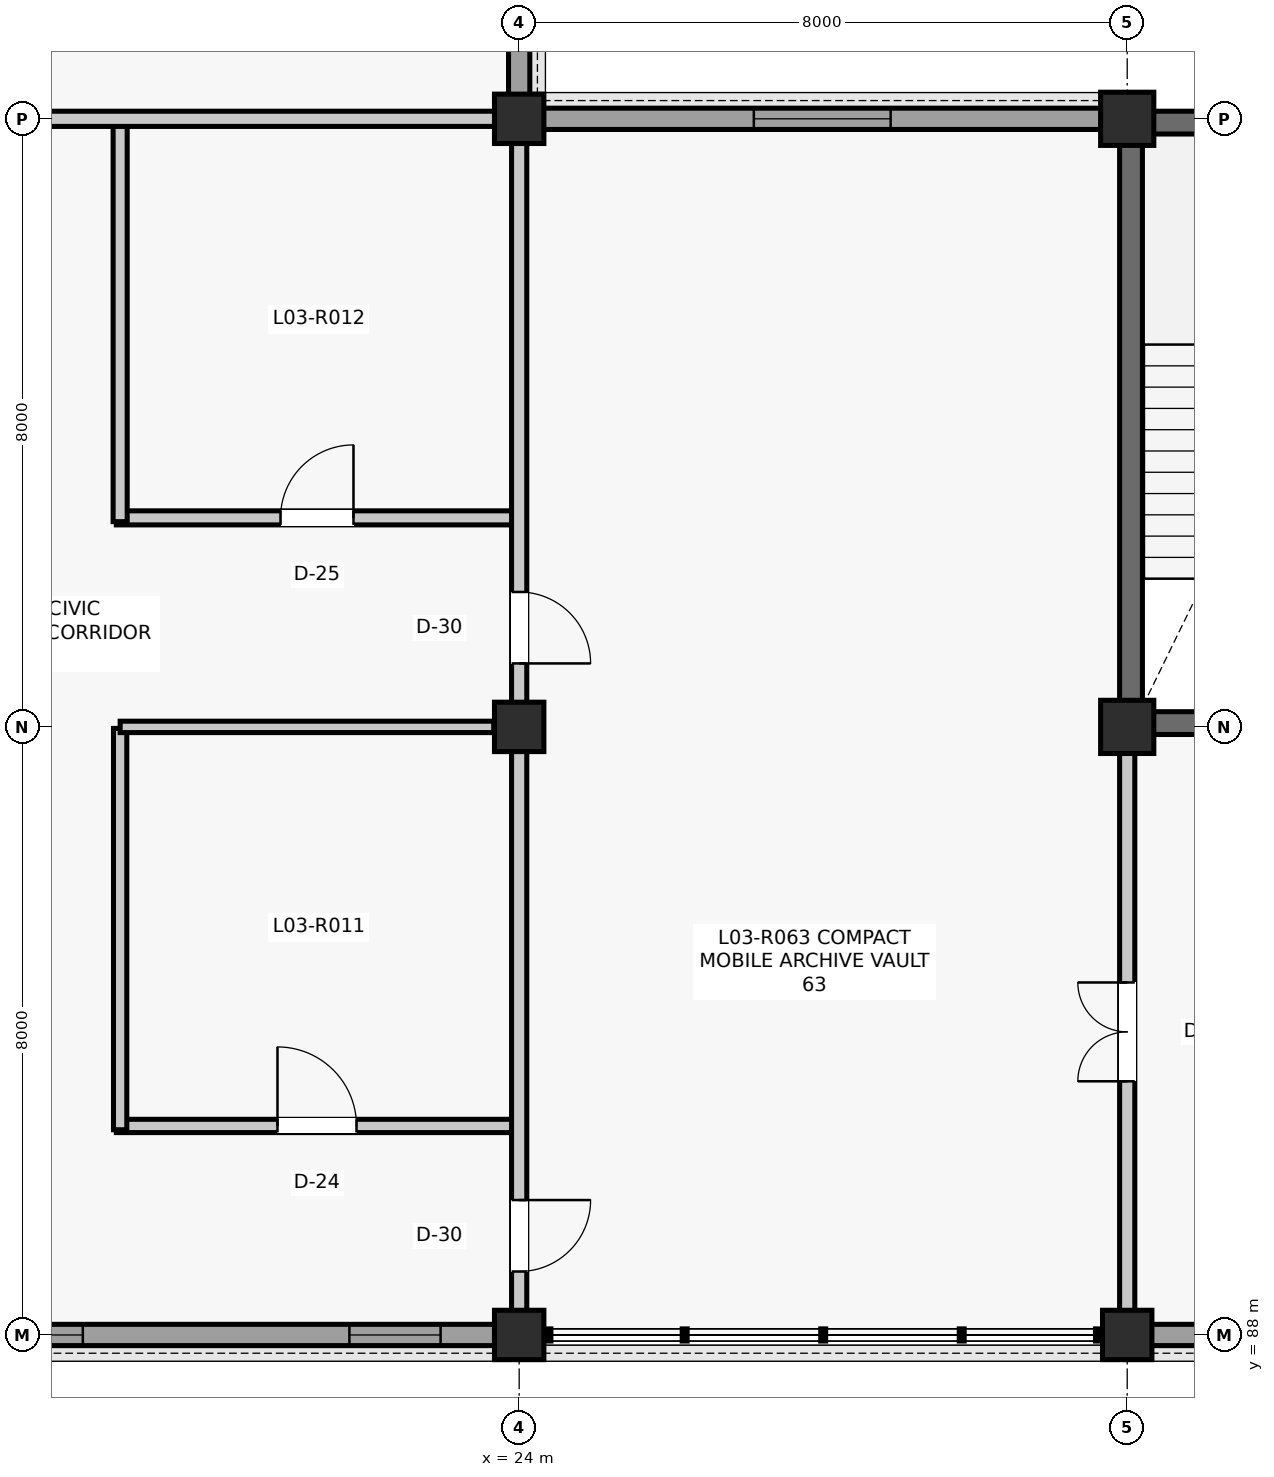
"""IFC4 building model, lengths in metres.
Left out: names, types, materials, properties, quantities, classifications, styles, units other than length and angle.
Written with IfcOpenShell. Run it as: python <this file> out.ifc"""

import sys

from ifc_helpers import new_model, si_unit, direction, frame, frame_2d, origin, origin_2d, place, context, subcontext, project, spatial, rectangle, extrude, element, fill, save


model = new_model("IFC4")
c1 = context("Model", 3, precision=1e-05, world=origin(), true_north=direction((0.0, 1.0)))
c2 = subcontext(c1, "Body", "Model", "MODEL_VIEW")
j1 = project(units=[si_unit("LENGTHUNIT", "METRE"), si_unit("PLANEANGLEUNIT", "RADIAN")], contexts=[c1])
p1 = place(None, origin())
s1 = spatial("IfcSite", under=j1, at=p1, CompositionType="ELEMENT")
p2 = place(p1, origin())
s2 = spatial("IfcBuilding", under=s1, at=p2, CompositionType="ELEMENT")
p3 = place(p2, frame((0.0, 0.0, 13.86)))
s3 = spatial("IfcBuildingStorey", under=s2, at=p3, CompositionType="ELEMENT", Elevation=13.86)
for number, where, z_axis, x_axis in (
    (1, (24.0, 88.0, 0.0), (0.0, 0.0, 1.0), (1.0, 0.0, 0.0)),
    (2, (24.0, 96.0, 0.0), (0.0, 0.0, 1.0), (1.0, 0.0, 0.0)),
    (3, (24.0, 104.0, 0.0), (0.0, 0.0, 1.0), (1.0, 0.0, 0.0)),
    (4, (32.0, 88.0, 0.0), (0.0, 0.0, 1.0), (1.0, 0.0, 0.0)),
):
    element("IfcColumn", number, at=place(p3, frame(where, z_axis=z_axis, x_axis=x_axis)), inside=s3, PredefinedType="COLUMN", context=c2, shape_type="SweptSolid", body=[
        extrude(rectangle(XDim=0.65, YDim=0.65, at=origin_2d()), origin(), (0.0, 0.0, 1.0), 3.96),
    ])
for number, where, z_axis, x_axis in (
    (5, (32.0, 96.0, 0.0), (0.0, 0.0, 1.0), (1.0, 0.0, 0.0)),
    (6, (32.0, 104.0, 0.0), (0.0, 0.0, 1.0), (1.0, 0.0, 0.0)),
):
    element("IfcColumn", number, at=place(p3, frame(where, z_axis=z_axis, x_axis=x_axis)), inside=s3, PredefinedType="COLUMN", context=c2, shape_type="SweptSolid", body=[
        extrude(rectangle(XDim=0.7, YDim=0.7, at=origin_2d()), origin(), (0.0, 0.0, 1.0), 3.96),
    ])
p4 = place(p3, frame((16.335, 88.0, 0.0), z_axis=(0.0, 0.0, 1.0), x_axis=(1.0, 0.0, 0.0)))
e7 = element("IfcWall", 7, at=p4, inside=s3, PredefinedType="SOLIDWALL", context=c2, shape_type="SweptSolid", body=[
    extrude(rectangle(XDim=7.355, YDim=0.28, at=frame_2d((3.677, 0.0))), origin(), (0.0, 0.0, 1.0), 3.3),
])
p5 = place(p4, frame((0.724, 0.0, 0.95)))
e8 = element("IfcOpeningElement", 8, at=p5, cuts=e7, PredefinedType="OPENING", context=c2, shape_type="SweptSolid", body=[
    extrude(rectangle(XDim=1.2, YDim=1.8, at=frame_2d((0.6, 0.9))), frame((0.0, 0.15, 0.0), z_axis=(0.0, -1.0, 0.0), x_axis=(1.0, 0.0, 0.0)), (0.0, 0.0, 1.0), 0.3),
])
p6 = place(p4, frame((5.431, 0.0, 0.95)))
e9 = element("IfcOpeningElement", 9, at=p6, cuts=e7, PredefinedType="OPENING", context=c2, shape_type="SweptSolid", body=[
    extrude(rectangle(XDim=1.2, YDim=1.8, at=frame_2d((0.6, 0.9))), frame((0.0, 0.15, 0.0), z_axis=(0.0, -1.0, 0.0), x_axis=(1.0, 0.0, 0.0)), (0.0, 0.0, 1.0), 0.3),
])
p7 = place(p3, frame((24.0, 104.31, 0.0), z_axis=(0.0, 0.0, 1.0), x_axis=(0.0, 1.0, 0.0)))
e10 = element("IfcWall", 10, at=p7, inside=s3, PredefinedType="SOLIDWALL", context=c2, shape_type="SweptSolid", body=[
    extrude(rectangle(XDim=7.38, YDim=0.28, at=frame_2d((3.69, 0.0))), origin(), (0.0, 0.0, 1.0), 3.367),
])
p8 = place(p7, frame((2.79, 0.0, 1.35)))
e11 = element("IfcOpeningElement", 11, at=p8, cuts=e10, PredefinedType="OPENING", context=c2, shape_type="SweptSolid", body=[
    extrude(rectangle(XDim=1.8, YDim=1.2, at=frame_2d((0.9, 0.6))), frame((0.0, 0.15, 0.0), z_axis=(0.0, -1.0, 0.0), x_axis=(1.0, 0.0, 0.0)), (0.0, 0.0, 1.0), 0.3),
])
p9 = place(p3, frame((24.31, 104.0, 0.0), z_axis=(0.0, 0.0, 1.0), x_axis=(1.0, 0.0, 0.0)))
e12 = element("IfcWall", 12, at=p9, inside=s3, PredefinedType="SOLIDWALL", context=c2, shape_type="SweptSolid", body=[
    extrude(rectangle(XDim=7.355, YDim=0.28, at=frame_2d((3.677, 0.0))), origin(), (0.0, 0.0, 1.0), 3.367),
])
p10 = place(p9, frame((2.778, 0.0, 1.35)))
e13 = element("IfcOpeningElement", 13, at=p10, cuts=e12, PredefinedType="OPENING", context=c2, shape_type="SweptSolid", body=[
    extrude(rectangle(XDim=1.8, YDim=1.2, at=frame_2d((0.9, 0.6))), frame((0.0, 0.15, 0.0), z_axis=(0.0, -1.0, 0.0), x_axis=(1.0, 0.0, 0.0)), (0.0, 0.0, 1.0), 0.3),
])
p11 = place(p3, frame((32.31, 88.0, 0.0), z_axis=(0.0, 0.0, 1.0), x_axis=(1.0, 0.0, 0.0)))
e14 = element("IfcWall", 14, at=p11, inside=s3, PredefinedType="SOLIDWALL", context=c2, shape_type="SweptSolid", body=[
    extrude(rectangle(XDim=7.38, YDim=0.28, at=frame_2d((3.69, 0.0))), origin(), (0.0, 0.0, 1.0), 3.304),
])
p12 = place(p11, frame((2.79, 0.0, 1.35)))
e15 = element("IfcOpeningElement", 15, at=p12, cuts=e14, PredefinedType="OPENING", context=c2, shape_type="SweptSolid", body=[
    extrude(rectangle(XDim=1.8, YDim=1.2, at=frame_2d((0.9, 0.6))), frame((0.0, 0.15, 0.0), z_axis=(0.0, -1.0, 0.0), x_axis=(1.0, 0.0, 0.0)), (0.0, 0.0, 1.0), 0.3),
])
for number, where, z_axis, x_axis in (
    (16, (32.05, 96.24, 0.0), (0.0, 0.0, 1.0), (0.0, 1.0, 0.0)),
    (17, (32.24, 103.95, 0.0), (0.0, 0.0, 1.0), (1.0, 0.0, 0.0)),
):
    element("IfcWall", number, at=place(p3, frame(where, z_axis=z_axis, x_axis=x_axis)), inside=s3, PredefinedType="SHEAR", context=c2, shape_type="SweptSolid", body=[
        extrude(rectangle(XDim=7.52, YDim=0.3, at=frame_2d((3.76, 0.0))), origin(), (0.0, 0.0, 1.0), 3.725),
    ])
p13 = place(p3, frame((32.24, 96.05, 0.0), z_axis=(0.0, 0.0, 1.0), x_axis=(1.0, 0.0, 0.0)))
e18 = element("IfcWall", 18, at=p13, inside=s3, PredefinedType="SHEAR", context=c2, shape_type="SweptSolid", body=[
    extrude(rectangle(XDim=3.91, YDim=0.3, at=frame_2d((1.955, 0.0))), origin(), (0.0, 0.0, 1.0), 3.725),
])
p14 = place(p3, frame((18.7, 90.75, 0.0), z_axis=(0.0, 0.0, 1.0), x_axis=(1.0, 0.0, 0.0)))
e19 = element("IfcWall", 19, at=p14, inside=s3, PredefinedType="PARTITIONING", context=c2, shape_type="SweptSolid", body=[
    extrude(rectangle(XDim=5.28, YDim=0.175, at=frame_2d((2.64, 0.0))), origin(), (0.0, 0.0, 1.0), 3.358),
])
p15 = place(p14, frame((2.12, 0.0, 0.0)))
e20 = element("IfcOpeningElement", 20, at=p15, cuts=e19, PredefinedType="OPENING", context=c2, shape_type="SweptSolid", body=[
    extrude(rectangle(XDim=1.04, YDim=2.18, at=frame_2d((0.52, 1.09))), frame((0.0, 0.097, 0.0), z_axis=(0.0, -1.0, 0.0), x_axis=(1.0, 0.0, 0.0)), (0.0, 0.0, 1.0), 0.195),
])
p16 = place(p3, frame((18.75, 90.7, 0.0), z_axis=(0.0, 0.0, 1.0), x_axis=(0.0, 1.0, 0.0)))
e21 = element("IfcWall", 21, at=p16, inside=s3, PredefinedType="PARTITIONING", context=c2, shape_type="SweptSolid", body=[
    extrude(rectangle(XDim=5.28, YDim=0.175, at=frame_2d((2.64, 0.0))), origin(), (0.0, 0.0, 1.0), 3.241),
])
p17 = place(p3, frame((18.75, 96.0, 0.0), z_axis=(0.0, 0.0, 1.0), x_axis=(1.0, 0.0, 0.0)))
e22 = element("IfcWall", 22, at=p17, inside=s3, PredefinedType="PARTITIONING", context=c2, shape_type="SweptSolid", body=[
    extrude(rectangle(XDim=4.915, YDim=0.15, at=frame_2d((2.458, 0.0))), origin(), (0.0, 0.0, 1.0), 3.241),
])
p18 = place(p3, frame((18.7, 98.75, 0.0), z_axis=(0.0, 0.0, 1.0), x_axis=(1.0, 0.0, 0.0)))
e23 = element("IfcWall", 23, at=p18, inside=s3, PredefinedType="PARTITIONING", context=c2, shape_type="SweptSolid", body=[
    extrude(rectangle(XDim=5.28, YDim=0.185, at=frame_2d((2.64, 0.0))), origin(), (0.0, 0.0, 1.0), 3.247),
])
p19 = place(p18, frame((2.16, 0.0, 0.0)))
e24 = element("IfcOpeningElement", 24, at=p19, cuts=e23, PredefinedType="OPENING", context=c2, shape_type="SweptSolid", body=[
    extrude(rectangle(XDim=0.96, YDim=2.14, at=frame_2d((0.48, 1.07))), frame((0.0, 0.103, 0.0), z_axis=(0.0, -1.0, 0.0), x_axis=(1.0, 0.0, 0.0)), (0.0, 0.0, 1.0), 0.205),
])
p20 = place(p3, frame((18.75, 98.7, 0.0), z_axis=(0.0, 0.0, 1.0), x_axis=(0.0, 1.0, 0.0)))
e25 = element("IfcWall", 25, at=p20, inside=s3, PredefinedType="PARTITIONING", context=c2, shape_type="SweptSolid", body=[
    extrude(rectangle(XDim=5.28, YDim=0.185, at=frame_2d((2.64, 0.0))), origin(), (0.0, 0.0, 1.0), 3.392),
])
p21 = place(p3, frame((24.0, 88.315, 0.0), z_axis=(0.0, 0.0, 1.0), x_axis=(0.0, 1.0, 0.0)))
e26 = element("IfcWall", 26, at=p21, inside=s3, PredefinedType="PARTITIONING", context=c2, shape_type="SweptSolid", body=[
    extrude(rectangle(XDim=7.37, YDim=0.2, at=frame_2d((3.685, 0.0))), origin(), (0.0, 0.0, 1.0), 3.452),
])
p22 = place(p21, frame((0.52, 0.0, 0.0)))
e27 = element("IfcOpeningElement", 27, at=p22, cuts=e26, PredefinedType="OPENING", context=c2, shape_type="SweptSolid", body=[
    extrude(rectangle(XDim=0.94, YDim=2.12, at=frame_2d((0.47, 1.06))), frame((0.0, 0.11, 0.0), z_axis=(0.0, -1.0, 0.0), x_axis=(1.0, 0.0, 0.0)), (0.0, 0.0, 1.0), 0.22),
])
p23 = place(p3, frame((24.0, 96.315, 0.0), z_axis=(0.0, 0.0, 1.0), x_axis=(0.0, 1.0, 0.0)))
e28 = element("IfcWall", 28, at=p23, inside=s3, PredefinedType="PARTITIONING", context=c2, shape_type="SweptSolid", body=[
    extrude(rectangle(XDim=7.37, YDim=0.2, at=frame_2d((3.685, 0.0))), origin(), (0.0, 0.0, 1.0), 3.247),
])
p24 = place(p23, frame((0.52, 0.0, 0.0)))
e29 = element("IfcOpeningElement", 29, at=p24, cuts=e28, PredefinedType="OPENING", context=c2, shape_type="SweptSolid", body=[
    extrude(rectangle(XDim=0.94, YDim=2.12, at=frame_2d((0.47, 1.06))), frame((0.0, 0.11, 0.0), z_axis=(0.0, -1.0, 0.0), x_axis=(1.0, 0.0, 0.0)), (0.0, 0.0, 1.0), 0.22),
])
p25 = place(p3, frame((16.315, 104.0, 0.0), z_axis=(0.0, 0.0, 1.0), x_axis=(1.0, 0.0, 0.0)))
e30 = element("IfcWall", 30, at=p25, inside=s3, PredefinedType="PARTITIONING", context=c2, shape_type="SweptSolid", body=[
    extrude(rectangle(XDim=7.37, YDim=0.2, at=frame_2d((3.685, 0.0))), origin(), (0.0, 0.0, 1.0), 3.452),
])
p26 = place(p25, frame((0.52, 0.0, 0.0)))
e31 = element("IfcOpeningElement", 31, at=p26, cuts=e30, PredefinedType="OPENING", context=c2, shape_type="SweptSolid", body=[
    extrude(rectangle(XDim=0.94, YDim=2.12, at=frame_2d((0.47, 1.06))), frame((0.0, 0.11, 0.0), z_axis=(0.0, -1.0, 0.0), x_axis=(1.0, 0.0, 0.0)), (0.0, 0.0, 1.0), 0.22),
])
p27 = place(p3, frame((32.0, 88.315, 0.0), z_axis=(0.0, 0.0, 1.0), x_axis=(0.0, 1.0, 0.0)))
e32 = element("IfcWall", 32, at=p27, inside=s3, PredefinedType="PARTITIONING", context=c2, shape_type="SweptSolid", body=[
    extrude(rectangle(XDim=7.345, YDim=0.2, at=frame_2d((3.672, 0.0))), origin(), (0.0, 0.0, 1.0), 3.247),
])
p28 = place(p27, frame((3.022, 0.0, 0.0)))
e33 = element("IfcOpeningElement", 33, at=p28, cuts=e32, PredefinedType="OPENING", context=c2, shape_type="SweptSolid", body=[
    extrude(rectangle(XDim=1.3, YDim=2.2, at=frame_2d((0.65, 1.1))), frame((0.0, 0.11, 0.0), z_axis=(0.0, -1.0, 0.0), x_axis=(1.0, 0.0, 0.0)), (0.0, 0.0, 1.0), 0.22),
])
p29 = place(p5, origin())
e34 = element("IfcWindow", 34, at=p29, inside=s3, PartitioningType="SINGLE_PANEL", PredefinedType="WINDOW", context=c2, shape_type="SweptSolid", body=[
    extrude(rectangle(XDim=1.2, YDim=1.8, at=frame_2d((0.6, 0.9))), frame((0.0, 0.03, 0.0), z_axis=(0.0, -1.0, 0.0), x_axis=(1.0, 0.0, 0.0)), (0.0, 0.0, 1.0), 0.06),
])
fill(e8, e34)
p30 = place(p6, origin())
e35 = element("IfcWindow", 35, at=p30, inside=s3, PartitioningType="SINGLE_PANEL", PredefinedType="WINDOW", context=c2, shape_type="SweptSolid", body=[
    extrude(rectangle(XDim=1.2, YDim=1.8, at=frame_2d((0.6, 0.9))), frame((0.0, 0.03, 0.0), z_axis=(0.0, -1.0, 0.0), x_axis=(1.0, 0.0, 0.0)), (0.0, 0.0, 1.0), 0.06),
])
fill(e9, e35)
p31 = place(p10, origin())
e36 = element("IfcWindow", 36, at=p31, inside=s3, PartitioningType="SINGLE_PANEL", PredefinedType="WINDOW", context=c2, shape_type="SweptSolid", body=[
    extrude(rectangle(XDim=1.8, YDim=1.2, at=frame_2d((0.9, 0.6))), frame((0.0, 0.03, 0.0), z_axis=(0.0, -1.0, 0.0), x_axis=(1.0, 0.0, 0.0)), (0.0, 0.0, 1.0), 0.06),
])
fill(e13, e36)
p32 = place(p15, origin())
e37 = element("IfcDoor", 37, at=p32, inside=s3, OperationType="SINGLE_SWING_LEFT", PredefinedType="DOOR", context=c2, shape_type="SweptSolid", body=[
    extrude(rectangle(XDim=1.04, YDim=2.18, at=frame_2d((0.52, 1.09))), frame((0.0, 0.025, 0.0), z_axis=(0.0, -1.0, 0.0), x_axis=(1.0, 0.0, 0.0)), (0.0, 0.0, 1.0), 0.05),
])
fill(e20, e37)
p33 = place(p19, origin())
e38 = element("IfcDoor", 38, at=p33, inside=s3, OperationType="SINGLE_SWING_RIGHT", PredefinedType="DOOR", context=c2, shape_type="SweptSolid", body=[
    extrude(rectangle(XDim=0.96, YDim=2.14, at=frame_2d((0.48, 1.07))), frame((0.0, 0.025, 0.0), z_axis=(0.0, -1.0, 0.0), x_axis=(1.0, 0.0, 0.0)), (0.0, 0.0, 1.0), 0.05),
])
fill(e24, e38)
p34 = place(p22, frame((0.94, 0.0, 0.0), z_axis=(0.0, 0.0, 1.0), x_axis=(-1.0, 0.0, 0.0)))
e39 = element("IfcDoor", 39, at=p34, inside=s3, OperationType="SINGLE_SWING_RIGHT", PredefinedType="DOOR", context=c2, shape_type="SweptSolid", body=[
    extrude(rectangle(XDim=0.94, YDim=2.12, at=frame_2d((0.47, 1.06))), frame((0.0, 0.025, 0.0), z_axis=(0.0, -1.0, 0.0), x_axis=(1.0, 0.0, 0.0)), (0.0, 0.0, 1.0), 0.05),
])
fill(e27, e39)
p35 = place(p24, frame((0.94, 0.0, 0.0), z_axis=(0.0, 0.0, 1.0), x_axis=(-1.0, 0.0, 0.0)))
e40 = element("IfcDoor", 40, at=p35, inside=s3, OperationType="SINGLE_SWING_LEFT", PredefinedType="DOOR", context=c2, shape_type="SweptSolid", body=[
    extrude(rectangle(XDim=0.94, YDim=2.12, at=frame_2d((0.47, 1.06))), frame((0.0, 0.025, 0.0), z_axis=(0.0, -1.0, 0.0), x_axis=(1.0, 0.0, 0.0)), (0.0, 0.0, 1.0), 0.05),
])
fill(e29, e40)
p36 = place(p28, origin())
e41 = element("IfcDoor", 41, at=p36, inside=s3, OperationType="DOUBLE_DOOR_SINGLE_SWING", PredefinedType="DOOR", context=c2, shape_type="SweptSolid", body=[
    extrude(rectangle(XDim=1.3, YDim=2.2, at=frame_2d((0.65, 1.1))), frame((0.0, 0.025, 0.0), z_axis=(0.0, -1.0, 0.0), x_axis=(1.0, 0.0, 0.0)), (0.0, 0.0, 1.0), 0.05),
])
fill(e33, e41)
save(model, sys.argv[1])
